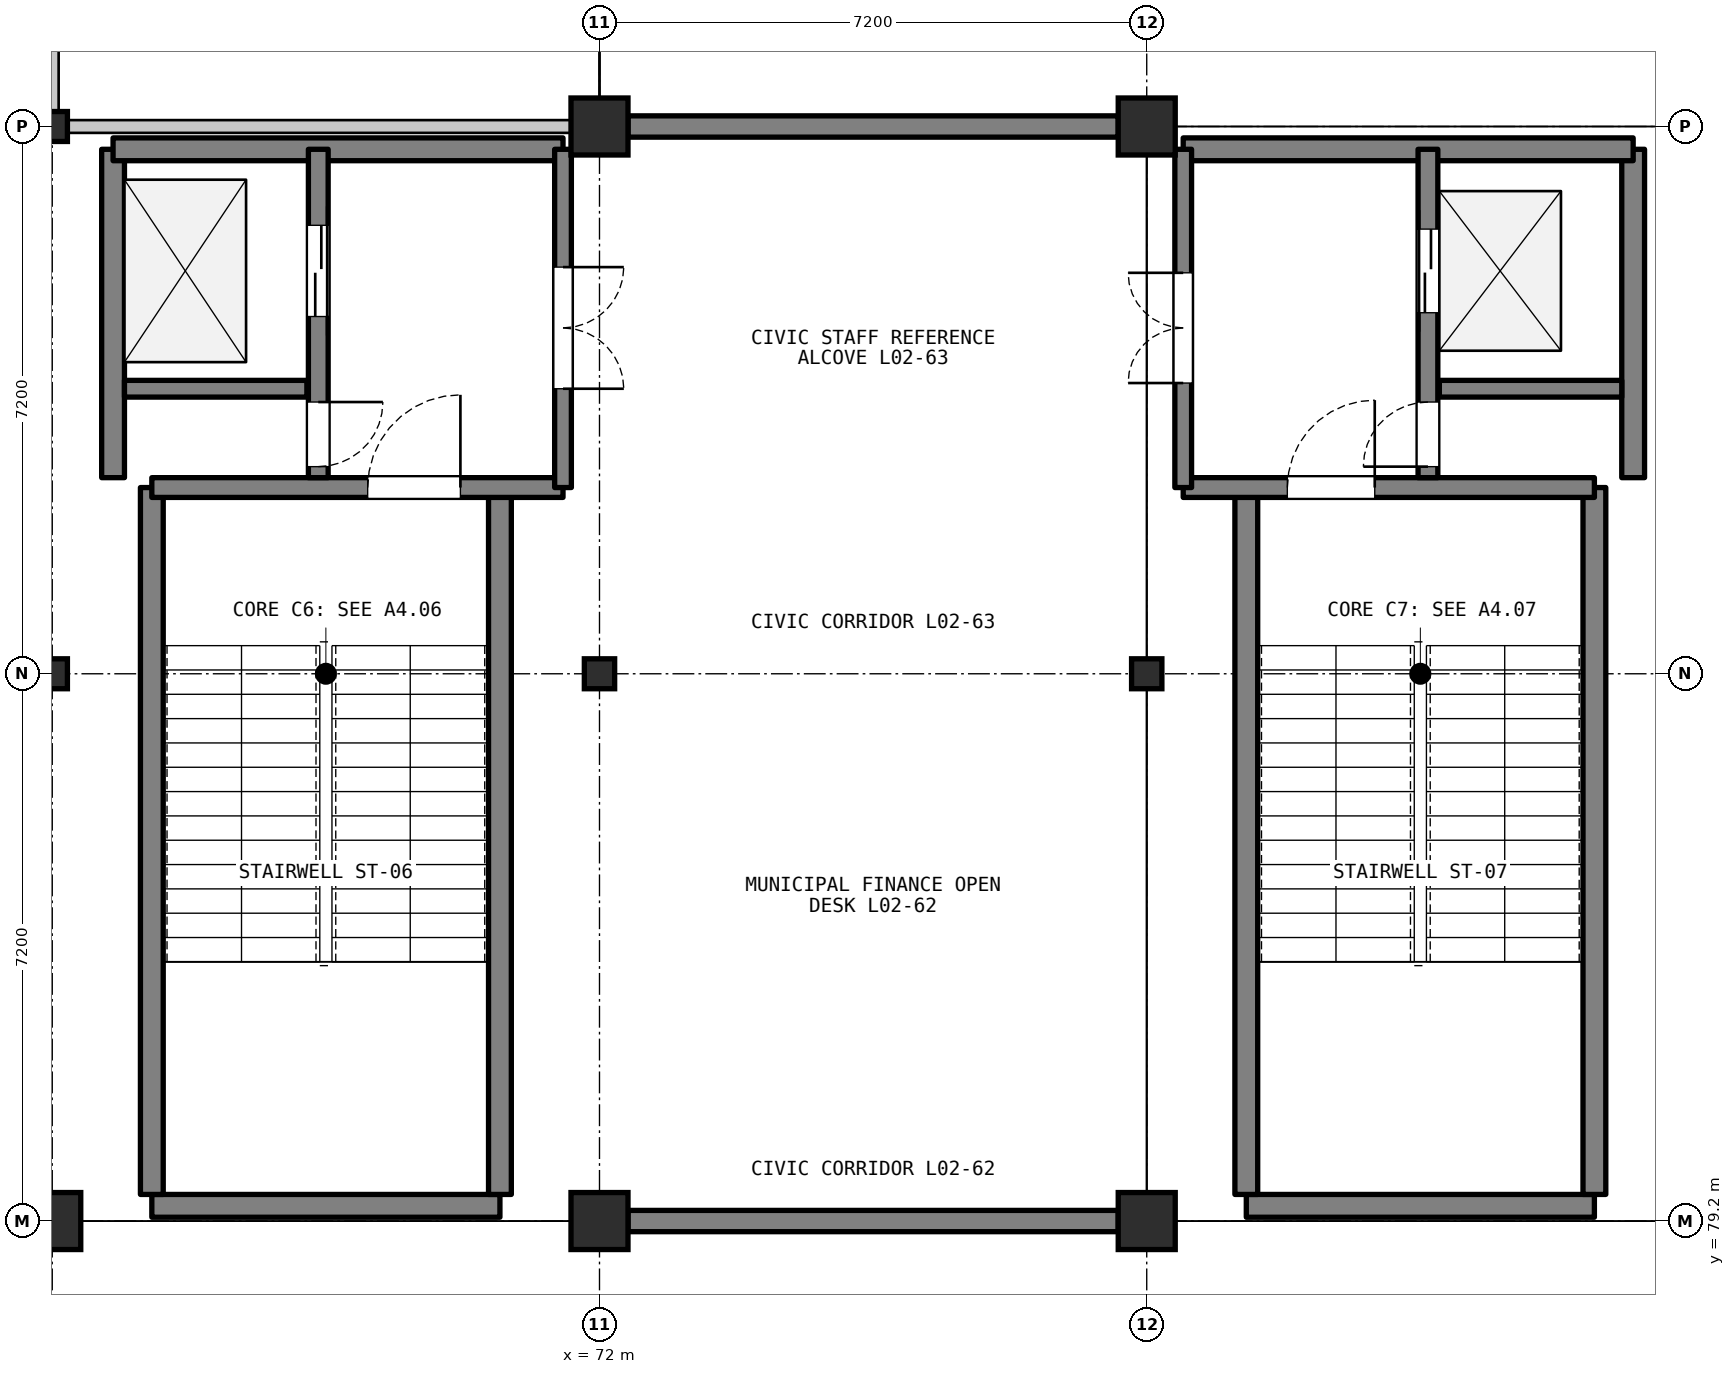
"""IFC4 building model, lengths in metres.
Left out: names, types, materials, properties, quantities, classifications, styles, units other than length and angle.
Written with IfcOpenShell. Run it as: python <this file> out.ifc"""

import sys

from ifc_helpers import new_model, si_unit, direction, frame, frame_2d, origin, origin_2d, place, context, subcontext, project, spatial, rectangle, i_section, extrude, element, fill, save


model = new_model("IFC4")
c1 = context("Model", 3, precision=1e-05, world=origin(), true_north=direction((0.0, 1.0)))
c2 = subcontext(c1, "Body", "Model", "MODEL_VIEW")
j1 = project(units=[si_unit("LENGTHUNIT", "METRE"), si_unit("PLANEANGLEUNIT", "RADIAN")], contexts=[c1])
p1 = place(None, origin())
s1 = spatial("IfcSite", under=j1, at=p1, CompositionType="ELEMENT")
p2 = place(p1, origin())
s2 = spatial("IfcBuilding", under=s1, at=p2, CompositionType="ELEMENT")
p3 = place(p2, frame((0.0, 0.0, 5.4)))
s3 = spatial("IfcBuildingStorey", under=s2, at=p3, CompositionType="ELEMENT", Elevation=5.4)
p4 = place(p3, frame((64.8, 79.2, 0.0), z_axis=(0.0, 0.0, 1.0), x_axis=(1.0, 0.0, 0.0)))
e1 = element("IfcColumn", 1, at=p4, inside=s3, PredefinedType="COLUMN", context=c2, shape_type="SweptSolid", body=[
    extrude(rectangle(XDim=0.75, YDim=0.75, at=origin_2d()), origin(), (0.0, 0.0, 1.0), 4.5),
])
for number, where, z_axis, x_axis in (
    (2, (64.8, 86.4, 0.0), (0.0, 0.0, 1.0), (1.0, 0.0, 0.0)),
    (3, (64.8, 93.6, 0.0), (0.0, 0.0, 1.0), (1.0, 0.0, 0.0)),
):
    element("IfcColumn", number, at=place(p3, frame(where, z_axis=z_axis, x_axis=x_axis)), inside=s3, PredefinedType="COLUMN", context=c2, shape_type="SweptSolid", body=[
        extrude(i_section(OverallWidth=0.399, OverallDepth=0.394, WebThickness=0.023, FlangeThickness=0.037, FilletRadius=0.015, at=origin_2d()), origin(), (0.0, 0.0, 1.0), 4.5),
    ])
p5 = place(p3, frame((72.0, 79.2, 0.0), z_axis=(0.0, 0.0, 1.0), x_axis=(1.0, 0.0, 0.0)))
e4 = element("IfcColumn", 4, at=p5, inside=s3, PredefinedType="COLUMN", context=c2, shape_type="SweptSolid", body=[
    extrude(rectangle(XDim=0.75, YDim=0.75, at=origin_2d()), origin(), (0.0, 0.0, 1.0), 4.5),
])
p6 = place(p3, frame((72.0, 86.4, 0.0), z_axis=(0.0, 0.0, 1.0), x_axis=(1.0, 0.0, 0.0)))
e5 = element("IfcColumn", 5, at=p6, inside=s3, PredefinedType="COLUMN", context=c2, shape_type="SweptSolid", body=[
    extrude(i_section(OverallWidth=0.399, OverallDepth=0.394, WebThickness=0.023, FlangeThickness=0.037, FilletRadius=0.015, at=origin_2d()), origin(), (0.0, 0.0, 1.0), 4.5),
])
for number, where, z_axis, x_axis in (
    (6, (72.0, 93.6, 0.0), (0.0, 0.0, 1.0), (1.0, 0.0, 0.0)),
    (7, (79.2, 79.2, 0.0), (0.0, 0.0, 1.0), (1.0, 0.0, 0.0)),
):
    element("IfcColumn", number, at=place(p3, frame(where, z_axis=z_axis, x_axis=x_axis)), inside=s3, PredefinedType="COLUMN", context=c2, shape_type="SweptSolid", body=[
        extrude(rectangle(XDim=0.75, YDim=0.75, at=origin_2d()), origin(), (0.0, 0.0, 1.0), 4.5),
    ])
p7 = place(p3, frame((79.2, 86.4, 0.0), z_axis=(0.0, 0.0, 1.0), x_axis=(1.0, 0.0, 0.0)))
e8 = element("IfcColumn", 8, at=p7, inside=s3, PredefinedType="COLUMN", context=c2, shape_type="SweptSolid", body=[
    extrude(i_section(OverallWidth=0.399, OverallDepth=0.394, WebThickness=0.023, FlangeThickness=0.037, FilletRadius=0.015, at=origin_2d()), origin(), (0.0, 0.0, 1.0), 4.5),
])
p8 = place(p3, frame((79.2, 93.6, 0.0), z_axis=(0.0, 0.0, 1.0), x_axis=(1.0, 0.0, 0.0)))
e9 = element("IfcColumn", 9, at=p8, inside=s3, PredefinedType="COLUMN", context=c2, shape_type="SweptSolid", body=[
    extrude(rectangle(XDim=0.75, YDim=0.75, at=origin_2d()), origin(), (0.0, 0.0, 1.0), 4.5),
])
for number, where, z_axis, x_axis in (
    (10, (78.825, 79.2, 0.0), (0.0, 0.0, 1.0), (-1.0, 0.0, 0.0)),
    (11, (72.375, 93.6, 0.0), (0.0, 0.0, 1.0), (1.0, 0.0, 0.0)),
):
    element("IfcWall", number, at=place(p3, frame(where, z_axis=z_axis, x_axis=x_axis)), inside=s3, PredefinedType="SOLIDWALL", context=c2, shape_type="SweptSolid", body=[
        extrude(rectangle(XDim=6.45, YDim=0.28, at=frame_2d((3.225, 0.0))), origin(), (0.0, 0.0, 1.0), 3.698),
    ])
p9 = place(p3, frame((66.11, 79.4, 0.0), z_axis=(0.0, 0.0, 1.0), x_axis=(1.0, 0.0, 0.0)))
e12 = element("IfcWall", 12, at=p9, inside=s3, PredefinedType="SHEAR", context=c2, shape_type="SweptSolid", body=[
    extrude(rectangle(XDim=4.58, YDim=0.3, at=frame_2d((2.29, 0.0))), origin(), (0.0, 0.0, 1.0), 4.3),
])
for number, where, z_axis, x_axis in (
    (13, (66.11, 79.55, 0.0), (0.0, 0.0, 1.0), (0.0, 1.0, 0.0)),
    (14, (70.69, 79.55, 0.0), (0.0, 0.0, 1.0), (0.0, 1.0, 0.0)),
):
    element("IfcWall", number, at=place(p3, frame(where, z_axis=z_axis, x_axis=x_axis)), inside=s3, PredefinedType="SHEAR", context=c2, shape_type="SweptSolid", body=[
        extrude(rectangle(XDim=9.3, YDim=0.3, at=frame_2d((4.65, 0.0))), origin(), (0.0, 0.0, 1.0), 4.3),
    ])
p10 = place(p3, frame((66.11, 88.85, 0.0), z_axis=(0.0, 0.0, 1.0), x_axis=(1.0, 0.0, 0.0)))
e15 = element("IfcWall", 15, at=p10, inside=s3, PredefinedType="SHEAR", context=c2, shape_type="SweptSolid", body=[
    extrude(rectangle(XDim=5.41, YDim=0.26, at=frame_2d((2.705, 0.0))), origin(), (0.0, 0.0, 1.0), 4.3),
])
p11 = place(p10, frame((2.84, 0.0, 0.0)))
e16 = element("IfcOpeningElement", 16, at=p11, cuts=e15, PredefinedType="OPENING", context=c2, shape_type="SweptSolid", body=[
    extrude(rectangle(XDim=1.22, YDim=2.15, at=frame_2d((0.61, 1.075))), frame((0.0, 0.14, 0.0), z_axis=(0.0, -1.0, 0.0), x_axis=(1.0, 0.0, 0.0)), (0.0, 0.0, 1.0), 0.28),
])
p12 = place(p3, frame((65.6, 88.98, 0.0), z_axis=(0.0, 0.0, 1.0), x_axis=(0.0, 1.0, 0.0)))
e17 = element("IfcWall", 17, at=p12, inside=s3, PredefinedType="SHEAR", context=c2, shape_type="SweptSolid", body=[
    extrude(rectangle(XDim=4.32, YDim=0.3, at=frame_2d((2.16, 0.0))), origin(), (0.0, 0.0, 1.0), 4.3),
])
p13 = place(p3, frame((65.6, 93.3, 0.0), z_axis=(0.0, 0.0, 1.0), x_axis=(1.0, 0.0, 0.0)))
e18 = element("IfcWall", 18, at=p13, inside=s3, PredefinedType="SHEAR", context=c2, shape_type="SweptSolid", body=[
    extrude(rectangle(XDim=5.92, YDim=0.3, at=frame_2d((2.96, 0.0))), origin(), (0.0, 0.0, 1.0), 4.3),
])
p14 = place(p3, frame((65.75, 90.15, 0.0), z_axis=(0.0, 0.0, 1.0), x_axis=(1.0, 0.0, 0.0)))
e19 = element("IfcWall", 19, at=p14, inside=s3, PredefinedType="SHEAR", context=c2, shape_type="SweptSolid", body=[
    extrude(rectangle(XDim=2.4, YDim=0.22, at=frame_2d((1.2, 0.0))), origin(), (0.0, 0.0, 1.0), 4.3),
])
p15 = place(p3, frame((68.3, 93.3, 0.0), z_axis=(0.0, 0.0, 1.0), x_axis=(0.0, -1.0, 0.0)))
e20 = element("IfcWall", 20, at=p15, inside=s3, PredefinedType="SHEAR", context=c2, shape_type="SweptSolid", body=[
    extrude(rectangle(XDim=4.32, YDim=0.26, at=frame_2d((2.16, 0.0))), origin(), (0.0, 0.0, 1.0), 4.3),
])
p16 = place(p15, frame((1.0, 0.0, 0.0)))
e21 = element("IfcOpeningElement", 21, at=p16, cuts=e20, PredefinedType="OPENING", context=c2, shape_type="SweptSolid", body=[
    extrude(rectangle(XDim=1.2, YDim=2.15, at=frame_2d((0.6, 1.075))), frame((0.0, 0.14, 0.0), z_axis=(0.0, -1.0, 0.0), x_axis=(1.0, 0.0, 0.0)), (0.0, 0.0, 1.0), 0.28),
])
p17 = place(p15, frame((3.325, 0.0, 0.0)))
e22 = element("IfcOpeningElement", 22, at=p17, cuts=e20, PredefinedType="OPENING", context=c2, shape_type="SweptSolid", body=[
    extrude(rectangle(XDim=0.85, YDim=2.05, at=frame_2d((0.425, 1.025))), frame((0.0, 0.14, 0.0), z_axis=(0.0, -1.0, 0.0), x_axis=(1.0, 0.0, 0.0)), (0.0, 0.0, 1.0), 0.28),
])
p18 = place(p3, frame((71.52, 93.3, 0.0), z_axis=(0.0, 0.0, 1.0), x_axis=(0.0, -1.0, 0.0)))
e23 = element("IfcWall", 23, at=p18, inside=s3, PredefinedType="SHEAR", context=c2, shape_type="SweptSolid", body=[
    extrude(rectangle(XDim=4.45, YDim=0.22, at=frame_2d((2.225, 0.0))), origin(), (0.0, 0.0, 1.0), 4.3),
])
p19 = place(p18, frame((1.55, 0.0, 0.0)))
e24 = element("IfcOpeningElement", 24, at=p19, cuts=e23, PredefinedType="OPENING", context=c2, shape_type="SweptSolid", body=[
    extrude(rectangle(XDim=1.6, YDim=2.2, at=frame_2d((0.8, 1.1))), frame((0.0, 0.12, 0.0), z_axis=(0.0, -1.0, 0.0), x_axis=(1.0, 0.0, 0.0)), (0.0, 0.0, 1.0), 0.24),
])
p20 = place(p3, frame((80.51, 79.4, 0.0), z_axis=(0.0, 0.0, 1.0), x_axis=(1.0, 0.0, 0.0)))
e25 = element("IfcWall", 25, at=p20, inside=s3, PredefinedType="SHEAR", context=c2, shape_type="SweptSolid", body=[
    extrude(rectangle(XDim=4.58, YDim=0.3, at=frame_2d((2.29, 0.0))), origin(), (0.0, 0.0, 1.0), 4.3),
])
for number, where, z_axis, x_axis in (
    (26, (80.51, 79.55, 0.0), (0.0, 0.0, 1.0), (0.0, 1.0, 0.0)),
    (27, (85.09, 79.55, 0.0), (0.0, 0.0, 1.0), (0.0, 1.0, 0.0)),
):
    element("IfcWall", number, at=place(p3, frame(where, z_axis=z_axis, x_axis=x_axis)), inside=s3, PredefinedType="SHEAR", context=c2, shape_type="SweptSolid", body=[
        extrude(rectangle(XDim=9.3, YDim=0.3, at=frame_2d((4.65, 0.0))), origin(), (0.0, 0.0, 1.0), 4.3),
    ])
p21 = place(p3, frame((79.68, 88.85, 0.0), z_axis=(0.0, 0.0, 1.0), x_axis=(1.0, 0.0, 0.0)))
e28 = element("IfcWall", 28, at=p21, inside=s3, PredefinedType="SHEAR", context=c2, shape_type="SweptSolid", body=[
    extrude(rectangle(XDim=5.41, YDim=0.26, at=frame_2d((2.705, 0.0))), origin(), (0.0, 0.0, 1.0), 4.3),
])
p22 = place(p21, frame((1.37, 0.0, 0.0)))
e29 = element("IfcOpeningElement", 29, at=p22, cuts=e28, PredefinedType="OPENING", context=c2, shape_type="SweptSolid", body=[
    extrude(rectangle(XDim=1.15, YDim=2.15, at=frame_2d((0.575, 1.075))), frame((0.0, 0.14, 0.0), z_axis=(0.0, -1.0, 0.0), x_axis=(1.0, 0.0, 0.0)), (0.0, 0.0, 1.0), 0.28),
])
p23 = place(p3, frame((85.6, 88.98, 0.0), z_axis=(0.0, 0.0, 1.0), x_axis=(0.0, 1.0, 0.0)))
e30 = element("IfcWall", 30, at=p23, inside=s3, PredefinedType="SHEAR", context=c2, shape_type="SweptSolid", body=[
    extrude(rectangle(XDim=4.32, YDim=0.3, at=frame_2d((2.16, 0.0))), origin(), (0.0, 0.0, 1.0), 4.3),
])
p24 = place(p3, frame((79.68, 93.3, 0.0), z_axis=(0.0, 0.0, 1.0), x_axis=(1.0, 0.0, 0.0)))
e31 = element("IfcWall", 31, at=p24, inside=s3, PredefinedType="SHEAR", context=c2, shape_type="SweptSolid", body=[
    extrude(rectangle(XDim=5.92, YDim=0.3, at=frame_2d((2.96, 0.0))), origin(), (0.0, 0.0, 1.0), 4.3),
])
p25 = place(p3, frame((83.05, 90.15, 0.0), z_axis=(0.0, 0.0, 1.0), x_axis=(1.0, 0.0, 0.0)))
e32 = element("IfcWall", 32, at=p25, inside=s3, PredefinedType="SHEAR", context=c2, shape_type="SweptSolid", body=[
    extrude(rectangle(XDim=2.4, YDim=0.22, at=frame_2d((1.2, 0.0))), origin(), (0.0, 0.0, 1.0), 4.3),
])
p26 = place(p3, frame((82.9, 88.98, 0.0), z_axis=(0.0, 0.0, 1.0), x_axis=(0.0, 1.0, 0.0)))
e33 = element("IfcWall", 33, at=p26, inside=s3, PredefinedType="SHEAR", context=c2, shape_type="SweptSolid", body=[
    extrude(rectangle(XDim=4.32, YDim=0.26, at=frame_2d((2.16, 0.0))), origin(), (0.0, 0.0, 1.0), 4.3),
])
p27 = place(p26, frame((2.17, 0.0, 0.0)))
e34 = element("IfcOpeningElement", 34, at=p27, cuts=e33, PredefinedType="OPENING", context=c2, shape_type="SweptSolid", body=[
    extrude(rectangle(XDim=1.1, YDim=2.15, at=frame_2d((0.55, 1.075))), frame((0.0, 0.14, 0.0), z_axis=(0.0, -1.0, 0.0), x_axis=(1.0, 0.0, 0.0)), (0.0, 0.0, 1.0), 0.28),
])
p28 = place(p26, frame((0.145, 0.0, 0.0)))
e35 = element("IfcOpeningElement", 35, at=p28, cuts=e33, PredefinedType="OPENING", context=c2, shape_type="SweptSolid", body=[
    extrude(rectangle(XDim=0.85, YDim=2.05, at=frame_2d((0.425, 1.025))), frame((0.0, 0.14, 0.0), z_axis=(0.0, -1.0, 0.0), x_axis=(1.0, 0.0, 0.0)), (0.0, 0.0, 1.0), 0.28),
])
p29 = place(p3, frame((79.68, 88.85, 0.0), z_axis=(0.0, 0.0, 1.0), x_axis=(0.0, 1.0, 0.0)))
e36 = element("IfcWall", 36, at=p29, inside=s3, PredefinedType="SHEAR", context=c2, shape_type="SweptSolid", body=[
    extrude(rectangle(XDim=4.45, YDim=0.22, at=frame_2d((2.225, 0.0))), origin(), (0.0, 0.0, 1.0), 4.3),
])
p30 = place(p29, frame((1.375, 0.0, 0.0)))
e37 = element("IfcOpeningElement", 37, at=p30, cuts=e36, PredefinedType="OPENING", context=c2, shape_type="SweptSolid", body=[
    extrude(rectangle(XDim=1.45, YDim=2.2, at=frame_2d((0.725, 1.1))), frame((0.0, 0.12, 0.0), z_axis=(0.0, -1.0, 0.0), x_axis=(1.0, 0.0, 0.0)), (0.0, 0.0, 1.0), 0.24),
])
for number, where, z_axis, x_axis in (
    (38, (71.88, 93.6, 0.0), (0.0, 0.0, 1.0), (-1.0, 0.0, 0.0)),
    (39, (64.8, 93.72, 0.0), (0.0, 0.0, 1.0), (0.0, 1.0, 0.0)),
):
    element("IfcWall", number, at=place(p3, frame(where, z_axis=z_axis, x_axis=x_axis)), inside=s3, PredefinedType="PARTITIONING", context=c2, shape_type="SweptSolid", body=[
        extrude(rectangle(XDim=6.96, YDim=0.168, at=frame_2d((3.48, 0.0))), origin(), (0.0, 0.0, 1.0), 3.688),
    ])
p31 = place(p11, origin())
e40 = element("IfcDoor", 40, at=p31, inside=s3, OperationType="SINGLE_SWING_RIGHT", PredefinedType="DOOR", context=c2, shape_type="SweptSolid", body=[
    extrude(rectangle(XDim=1.22, YDim=2.15, at=frame_2d((0.61, 1.075))), frame((0.0, 0.025, 0.0), z_axis=(0.0, -1.0, 0.0), x_axis=(1.0, 0.0, 0.0)), (0.0, 0.0, 1.0), 0.05),
])
fill(e16, e40)
p32 = place(p16, origin())
e41 = element("IfcDoor", 41, at=p32, inside=s3, OperationType="DOUBLE_DOOR_SLIDING", PredefinedType="DOOR", context=c2, shape_type="SweptSolid", body=[
    extrude(rectangle(XDim=1.2, YDim=2.15, at=frame_2d((0.6, 1.075))), frame((0.0, 0.025, 0.0), z_axis=(0.0, -1.0, 0.0), x_axis=(1.0, 0.0, 0.0)), (0.0, 0.0, 1.0), 0.05),
])
fill(e21, e41)
p33 = place(p17, origin())
e42 = element("IfcDoor", 42, at=p33, inside=s3, OperationType="SINGLE_SWING_LEFT", PredefinedType="DOOR", context=c2, shape_type="SweptSolid", body=[
    extrude(rectangle(XDim=0.85, YDim=2.05, at=frame_2d((0.425, 1.025))), frame((0.0, 0.025, 0.0), z_axis=(0.0, -1.0, 0.0), x_axis=(1.0, 0.0, 0.0)), (0.0, 0.0, 1.0), 0.05),
])
fill(e22, e42)
p34 = place(p19, origin())
e43 = element("IfcDoor", 43, at=p34, inside=s3, OperationType="DOUBLE_DOOR_SINGLE_SWING", PredefinedType="DOOR", context=c2, shape_type="SweptSolid", body=[
    extrude(rectangle(XDim=1.6, YDim=2.2, at=frame_2d((0.8, 1.1))), frame((0.0, 0.025, 0.0), z_axis=(0.0, -1.0, 0.0), x_axis=(1.0, 0.0, 0.0)), (0.0, 0.0, 1.0), 0.05),
])
fill(e24, e43)
p35 = place(p22, origin())
e44 = element("IfcDoor", 44, at=p35, inside=s3, OperationType="SINGLE_SWING_RIGHT", PredefinedType="DOOR", context=c2, shape_type="SweptSolid", body=[
    extrude(rectangle(XDim=1.15, YDim=2.15, at=frame_2d((0.575, 1.075))), frame((0.0, 0.025, 0.0), z_axis=(0.0, -1.0, 0.0), x_axis=(1.0, 0.0, 0.0)), (0.0, 0.0, 1.0), 0.05),
])
fill(e29, e44)
p36 = place(p27, origin())
e45 = element("IfcDoor", 45, at=p36, inside=s3, OperationType="DOUBLE_DOOR_SLIDING", PredefinedType="DOOR", context=c2, shape_type="SweptSolid", body=[
    extrude(rectangle(XDim=1.1, YDim=2.15, at=frame_2d((0.55, 1.075))), frame((0.0, 0.025, 0.0), z_axis=(0.0, -1.0, 0.0), x_axis=(1.0, 0.0, 0.0)), (0.0, 0.0, 1.0), 0.05),
])
fill(e34, e45)
p37 = place(p28, origin())
e46 = element("IfcDoor", 46, at=p37, inside=s3, OperationType="SINGLE_SWING_LEFT", PredefinedType="DOOR", context=c2, shape_type="SweptSolid", body=[
    extrude(rectangle(XDim=0.85, YDim=2.05, at=frame_2d((0.425, 1.025))), frame((0.0, 0.025, 0.0), z_axis=(0.0, -1.0, 0.0), x_axis=(1.0, 0.0, 0.0)), (0.0, 0.0, 1.0), 0.05),
])
fill(e35, e46)
p38 = place(p30, origin())
e47 = element("IfcDoor", 47, at=p38, inside=s3, OperationType="DOUBLE_DOOR_SINGLE_SWING", PredefinedType="DOOR", context=c2, shape_type="SweptSolid", body=[
    extrude(rectangle(XDim=1.45, YDim=2.2, at=frame_2d((0.725, 1.1))), frame((0.0, 0.025, 0.0), z_axis=(0.0, -1.0, 0.0), x_axis=(1.0, 0.0, 0.0)), (0.0, 0.0, 1.0), 0.05),
])
fill(e37, e47)
save(model, sys.argv[1])
